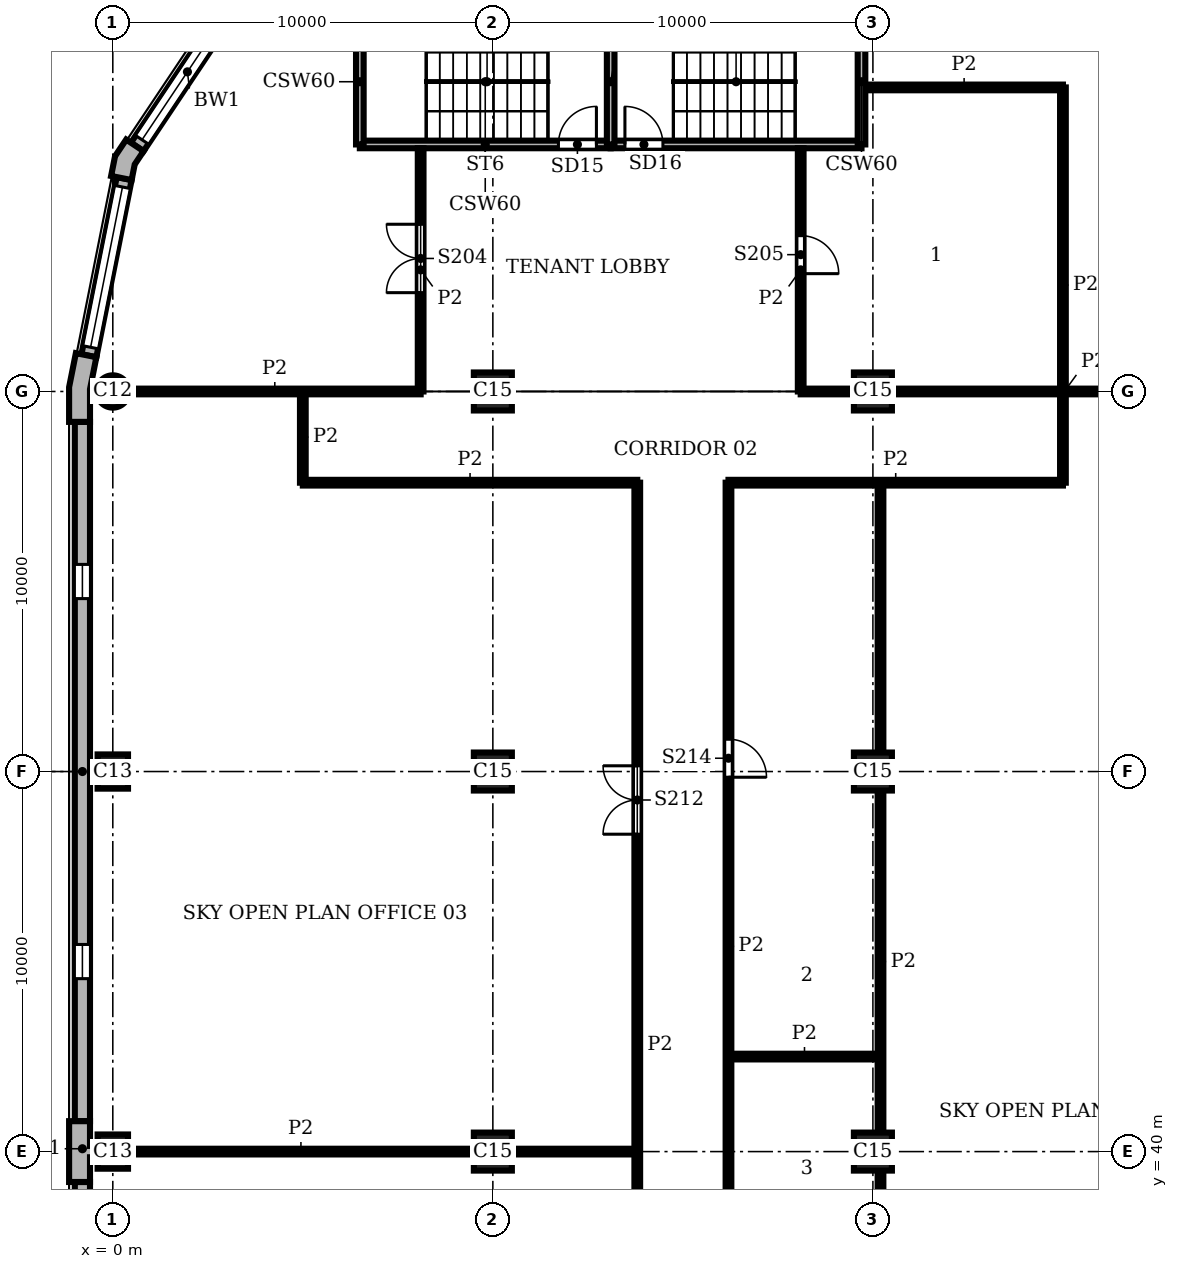
"""IFC4 building model, lengths in metres.
Left out: names, types, materials, properties, quantities, classifications, styles, units other than length and angle.
Written with IfcOpenShell. Run it as: python <this file> out.ifc"""

import sys

from ifc_helpers import new_model, si_unit, direction, frame, frame_2d, origin, origin_2d, place, context, subcontext, project, spatial, polyline, rectangle, circle, outline, extrude, element, fill, save


model = new_model("IFC4")
c1 = context("Model", 3, precision=1e-05, world=origin(), true_north=direction((0.0, 1.0)))
c2 = subcontext(c1, "Body", "Model", "MODEL_VIEW")
j1 = project(units=[si_unit("LENGTHUNIT", "METRE"), si_unit("PLANEANGLEUNIT", "RADIAN")], contexts=[c1])
p1 = place(None, origin())
s1 = spatial("IfcSite", under=j1, at=p1, CompositionType="ELEMENT")
p2 = place(p1, origin())
s2 = spatial("IfcBuilding", under=s1, at=p2, CompositionType="ELEMENT")
p3 = place(p2, frame((0.0, 0.0, 246.0)))
s3 = spatial("IfcBuildingStorey", under=s2, at=p3, CompositionType="ELEMENT", Elevation=246.0)
p4 = place(p3, frame((0.0, 60.0, 0.0), z_axis=(0.0, 0.0, 1.0), x_axis=(1.0, 0.0, 0.0)))
e1 = element("IfcColumn", 1, at=p4, inside=s3, PredefinedType="COLUMN", context=c2, shape_type="SweptSolid", body=[
    extrude(circle(Radius=0.425, at=origin_2d()), origin(), (0.0, 0.0, 1.0), 5.4),
])
for number, where, z_axis, x_axis in (
    (2, (0.0, 50.0, 0.0), (0.0, 0.0, 1.0), (0.0, 1.0, 0.0)),
    (3, (0.0, 40.0, 0.0), (0.0, 0.0, 1.0), (0.0, 1.0, 0.0)),
):
    element("IfcColumn", number, at=place(p3, frame(where, z_axis=z_axis, x_axis=x_axis)), inside=s3, PredefinedType="COLUMN", context=c2, shape_type="SweptSolid", body=[
        extrude(rectangle(XDim=0.9, YDim=0.8, at=origin_2d()), origin(), (0.0, 0.0, 1.0), 5.4),
    ])
for number, where, z_axis, x_axis in (
    (4, (10.0, 40.0, 0.0), (0.0, 0.0, 1.0), (1.0, 0.0, 0.0)),
    (5, (10.0, 50.0, 0.0), (0.0, 0.0, 1.0), (1.0, 0.0, 0.0)),
    (6, (10.0, 60.0, 0.0), (0.0, 0.0, 1.0), (1.0, 0.0, 0.0)),
    (7, (20.0, 40.0, 0.0), (0.0, 0.0, 1.0), (1.0, 0.0, 0.0)),
    (8, (20.0, 50.0, 0.0), (0.0, 0.0, 1.0), (1.0, 0.0, 0.0)),
    (9, (20.0, 60.0, 0.0), (0.0, 0.0, 1.0), (1.0, 0.0, 0.0)),
):
    element("IfcColumn", number, at=place(p3, frame(where, z_axis=z_axis, x_axis=x_axis)), inside=s3, PredefinedType="COLUMN", context=c2, shape_type="SweptSolid", body=[
        extrude(rectangle(XDim=1.0, YDim=1.0, at=origin_2d()), origin(), (0.0, 0.0, 1.0), 5.4),
    ])
p5 = place(p3, origin())
e10 = element("IfcWall", 10, at=p5, inside=s3, PredefinedType="SOLIDWALL", context=c2, shape_type="SweptSolid", body=[
    extrude(outline(polyline([(0.477, 66.545), (0.352, 66.629), (0.059, 66.189), (-0.045, 65.67), (0.103, 65.641), (0.495, 65.563), (0.577, 65.974), (0.81, 66.323), (0.477, 66.545)])), origin(), (0.0, 0.0, 1.0), 5.4),
])
e11 = element("IfcWall", 11, at=p5, inside=s3, PredefinedType="SOLIDWALL", context=c2, shape_type="SweptSolid", body=[
    extrude(outline(polyline([(-0.825, 60.98), (-0.972, 61.009), (-1.15, 60.113), (-1.15, 59.2), (-1.0, 59.2), (-0.6, 59.2), (-0.6, 60.059), (-0.432, 60.902), (-0.825, 60.98)])), origin(), (0.0, 0.0, 1.0), 5.4),
])
e12 = element("IfcWall", 12, at=p5, inside=s3, PredefinedType="SOLIDWALL", context=c2, shape_type="SweptSolid", body=[
    extrude(outline(polyline([(-0.6, 39.2), (-0.6, 39.85), (-0.45, 39.85), (-0.45, 40.15), (-0.6, 40.15), (-0.6, 40.8), (-1.0, 40.8), (-1.15, 40.8), (-1.15, 40.0), (-1.15, 39.2), (-1.0, 39.2), (-0.6, 39.2)])), origin(), (0.0, 0.0, 1.0), 5.4),
])
p6 = place(p3, frame((3.284, 70.386, 0.0), z_axis=(0.0, 0.0, 1.0), x_axis=(-0.555541552266, -0.831488775454, 0.0)))
e13 = element("IfcWall", 13, at=p6, inside=s3, PredefinedType="SOLIDWALL", context=c2, shape_type="SweptSolid", body=[
    extrude(rectangle(XDim=4.753, YDim=0.4, at=frame_2d((2.376, 0.0))), origin(), (0.0, 0.0, 1.0), 5.4),
])
p7 = place(p6, frame((0.226, 0.0, 0.9)))
e14 = element("IfcOpeningElement", 14, at=p7, cuts=e13, PredefinedType="OPENING", context=c2, shape_type="SweptSolid", body=[
    extrude(rectangle(XDim=4.3, YDim=3.4, at=frame_2d((2.15, 1.7))), frame((0.0, 0.21, 0.0), z_axis=(0.0, -1.0, 0.0), x_axis=(1.0, 0.0, 0.0)), (0.0, 0.0, 1.0), 0.42),
])
p8 = place(p3, frame((0.299, 65.602, 0.0), z_axis=(0.0, 0.0, 1.0), x_axis=(-0.195098533057, -0.98078364709, 0.0)))
e15 = element("IfcWall", 15, at=p8, inside=s3, PredefinedType="SOLIDWALL", context=c2, shape_type="SweptSolid", body=[
    extrude(rectangle(XDim=4.753, YDim=0.4, at=frame_2d((2.376, 0.0))), origin(), (0.0, 0.0, 1.0), 5.4),
])
p9 = place(p8, frame((0.226, 0.0, 0.9)))
e16 = element("IfcOpeningElement", 16, at=p9, cuts=e15, PredefinedType="OPENING", context=c2, shape_type="SweptSolid", body=[
    extrude(rectangle(XDim=4.3, YDim=3.4, at=frame_2d((2.15, 1.7))), frame((0.0, 0.21, 0.0), z_axis=(0.0, -1.0, 0.0), x_axis=(1.0, 0.0, 0.0)), (0.0, 0.0, 1.0), 0.42),
])
p10 = place(p3, frame((-0.8, 59.2, 0.0), z_axis=(0.0, 0.0, 1.0), x_axis=(0.0, -1.0, 0.0)))
e17 = element("IfcWall", 17, at=p10, inside=s3, PredefinedType="SOLIDWALL", context=c2, shape_type="SweptSolid", body=[
    extrude(rectangle(XDim=18.4, YDim=0.4, at=frame_2d((9.2, 0.0))), origin(), (0.0, 0.0, 1.0), 5.4),
])
p11 = place(p10, frame((3.75, 0.0, 0.9)))
e18 = element("IfcOpeningElement", 18, at=p11, cuts=e17, PredefinedType="OPENING", context=c2, shape_type="SweptSolid", body=[
    extrude(rectangle(XDim=0.9, YDim=3.4, at=frame_2d((0.45, 1.7))), frame((0.0, 0.21, 0.0), z_axis=(0.0, -1.0, 0.0), x_axis=(1.0, 0.0, 0.0)), (0.0, 0.0, 1.0), 0.42),
])
p12 = place(p10, frame((13.75, 0.0, 0.9)))
e19 = element("IfcOpeningElement", 19, at=p12, cuts=e17, PredefinedType="OPENING", context=c2, shape_type="SweptSolid", body=[
    extrude(rectangle(XDim=0.9, YDim=3.4, at=frame_2d((0.45, 1.7))), frame((0.0, 0.21, 0.0), z_axis=(0.0, -1.0, 0.0), x_axis=(1.0, 0.0, 0.0)), (0.0, 0.0, 1.0), 0.42),
])
p13 = place(p3, frame((-0.8, 39.2, 0.0), z_axis=(0.0, 0.0, 1.0), x_axis=(0.0, -1.0, 0.0)))
e20 = element("IfcWall", 20, at=p13, inside=s3, PredefinedType="SOLIDWALL", context=c2, shape_type="SweptSolid", body=[
    extrude(rectangle(XDim=18.4, YDim=0.4, at=frame_2d((9.2, 0.0))), origin(), (0.0, 0.0, 1.0), 5.4),
])
p14 = place(p13, frame((3.75, 0.0, 0.9)))
e21 = element("IfcOpeningElement", 21, at=p14, cuts=e20, PredefinedType="OPENING", context=c2, shape_type="SweptSolid", body=[
    extrude(rectangle(XDim=0.9, YDim=3.4, at=frame_2d((0.45, 1.7))), frame((0.0, 0.21, 0.0), z_axis=(0.0, -1.0, 0.0), x_axis=(1.0, 0.0, 0.0)), (0.0, 0.0, 1.0), 0.42),
])
p15 = place(p13, frame((13.75, 0.0, 0.9)))
e22 = element("IfcOpeningElement", 22, at=p15, cuts=e20, PredefinedType="OPENING", context=c2, shape_type="SweptSolid", body=[
    extrude(rectangle(XDim=0.9, YDim=3.4, at=frame_2d((0.45, 1.7))), frame((0.0, 0.21, 0.0), z_axis=(0.0, -1.0, 0.0), x_axis=(1.0, 0.0, 0.0)), (0.0, 0.0, 1.0), 0.42),
])
p16 = place(p3, frame((6.5, 66.5, 0.0), z_axis=(0.0, 0.0, 1.0), x_axis=(1.0, 0.0, 0.0)))
e23 = element("IfcWall", 23, at=p16, inside=s3, PredefinedType="SHEAR", context=c2, shape_type="SweptSolid", body=[
    extrude(rectangle(XDim=6.6, YDim=0.2, at=frame_2d((3.3, 0.0))), origin(), (0.0, 0.0, 1.0), 5.08),
])
p17 = place(p16, frame((5.225, 0.0, 0.0)))
e24 = element("IfcOpeningElement", 24, at=p17, cuts=e23, PredefinedType="OPENING", context=c2, shape_type="SweptSolid", body=[
    extrude(rectangle(XDim=1.0, YDim=2.1, at=frame_2d((0.5, 1.05))), frame((0.0, 0.11, 0.0), z_axis=(0.0, -1.0, 0.0), x_axis=(1.0, 0.0, 0.0)), (0.0, 0.0, 1.0), 0.22),
])
p18 = place(p3, frame((13.1, 66.5, 0.0), z_axis=(0.0, 0.0, 1.0), x_axis=(1.0, 0.0, 0.0)))
e25 = element("IfcWall", 25, at=p18, inside=s3, PredefinedType="SHEAR", context=c2, shape_type="SweptSolid", body=[
    extrude(rectangle(XDim=6.6, YDim=0.2, at=frame_2d((3.3, 0.0))), origin(), (0.0, 0.0, 1.0), 5.08),
])
p19 = place(p18, frame((0.375, 0.0, 0.0)))
e26 = element("IfcOpeningElement", 26, at=p19, cuts=e25, PredefinedType="OPENING", context=c2, shape_type="SweptSolid", body=[
    extrude(rectangle(XDim=1.0, YDim=2.1, at=frame_2d((0.5, 1.05))), frame((0.0, 0.11, 0.0), z_axis=(0.0, -1.0, 0.0), x_axis=(1.0, 0.0, 0.0)), (0.0, 0.0, 1.0), 0.22),
])
for number, where, z_axis, x_axis in (
    (27, (6.5, 66.5, 0.0), (0.0, 0.0, 1.0), (0.0, 1.0, 0.0)),
    (28, (13.1, 66.5, 0.0), (0.0, 0.0, 1.0), (0.0, 1.0, 0.0)),
    (29, (19.7, 66.5, 0.0), (0.0, 0.0, 1.0), (0.0, 1.0, 0.0)),
):
    element("IfcWall", number, at=place(p3, frame(where, z_axis=z_axis, x_axis=x_axis)), inside=s3, PredefinedType="SHEAR", context=c2, shape_type="SweptSolid", body=[
        extrude(rectangle(XDim=3.3, YDim=0.2, at=frame_2d((1.65, 0.0))), origin(), (0.0, 0.0, 1.0), 5.08),
    ])
p20 = place(p3, frame((5.0, 57.6, 0.0), z_axis=(0.0, 0.0, 1.0), x_axis=(0.0, 1.0, 0.0)))
e30 = element("IfcWall", 30, at=p20, inside=s3, PredefinedType="PARTITIONING", context=c2, shape_type="SweptSolid", body=[
    extrude(rectangle(XDim=2.4, YDim=0.15, at=frame_2d((1.2, 0.0))), origin(), (0.0, 0.0, 1.0), 5.08),
])
p21 = place(p3, frame((8.1, 60.0, 0.0), z_axis=(0.0, 0.0, 1.0), x_axis=(0.0, 1.0, 0.0)))
e31 = element("IfcWall", 31, at=p21, inside=s3, PredefinedType="PARTITIONING", context=c2, shape_type="SweptSolid", body=[
    extrude(rectangle(XDim=6.4, YDim=0.15, at=frame_2d((3.2, 0.0))), origin(), (0.0, 0.0, 1.0), 5.08),
])
p22 = place(p21, frame((2.6, 0.0, 0.0)))
e32 = element("IfcOpeningElement", 32, at=p22, cuts=e31, PredefinedType="OPENING", context=c2, shape_type="SweptSolid", body=[
    extrude(rectangle(XDim=1.8, YDim=2.1, at=frame_2d((0.9, 1.05))), frame((0.0, 0.085, 0.0), z_axis=(0.0, -1.0, 0.0), x_axis=(1.0, 0.0, 0.0)), (0.0, 0.0, 1.0), 0.17),
])
p23 = place(p3, frame((13.8, 28.0, 0.0), z_axis=(0.0, 0.0, 1.0), x_axis=(0.0, 1.0, 0.0)))
e33 = element("IfcWall", 33, at=p23, inside=s3, PredefinedType="PARTITIONING", context=c2, shape_type="SweptSolid", body=[
    extrude(rectangle(XDim=29.6, YDim=0.15, at=frame_2d((14.8, 0.0))), origin(), (0.0, 0.0, 1.0), 5.08),
])
p24 = place(p23, frame((20.351, 0.0, 0.0)))
e34 = element("IfcOpeningElement", 34, at=p24, cuts=e33, PredefinedType="OPENING", context=c2, shape_type="SweptSolid", body=[
    extrude(rectangle(XDim=1.8, YDim=2.1, at=frame_2d((0.9, 1.05))), frame((0.0, 0.085, 0.0), z_axis=(0.0, -1.0, 0.0), x_axis=(1.0, 0.0, 0.0)), (0.0, 0.0, 1.0), 0.17),
])
p25 = place(p3, frame((16.2, 33.2, 0.0), z_axis=(0.0, 0.0, 1.0), x_axis=(0.0, 1.0, 0.0)))
e35 = element("IfcWall", 35, at=p25, inside=s3, PredefinedType="PARTITIONING", context=c2, shape_type="SweptSolid", body=[
    extrude(rectangle(XDim=24.4, YDim=0.15, at=frame_2d((12.2, 0.0))), origin(), (0.0, 0.0, 1.0), 5.08),
])
p26 = place(p25, frame((4.35, 0.0, 0.0)))
e36 = element("IfcOpeningElement", 36, at=p26, cuts=e35, PredefinedType="OPENING", context=c2, shape_type="SweptSolid", body=[
    extrude(rectangle(XDim=1.0, YDim=2.1, at=frame_2d((0.5, 1.05))), frame((0.0, 0.085, 0.0), z_axis=(0.0, -1.0, 0.0), x_axis=(1.0, 0.0, 0.0)), (0.0, 0.0, 1.0), 0.17),
])
p27 = place(p25, frame((16.65, 0.0, 0.0)))
e37 = element("IfcOpeningElement", 37, at=p27, cuts=e35, PredefinedType="OPENING", context=c2, shape_type="SweptSolid", body=[
    extrude(rectangle(XDim=1.0, YDim=2.1, at=frame_2d((0.5, 1.05))), frame((0.0, 0.085, 0.0), z_axis=(0.0, -1.0, 0.0), x_axis=(1.0, 0.0, 0.0)), (0.0, 0.0, 1.0), 0.17),
])
p28 = place(p3, frame((18.1, 60.0, 0.0), z_axis=(0.0, 0.0, 1.0), x_axis=(0.0, 1.0, 0.0)))
e38 = element("IfcWall", 38, at=p28, inside=s3, PredefinedType="PARTITIONING", context=c2, shape_type="SweptSolid", body=[
    extrude(rectangle(XDim=6.4, YDim=0.15, at=frame_2d((3.2, 0.0))), origin(), (0.0, 0.0, 1.0), 5.08),
])
p29 = place(p28, frame((3.1, 0.0, 0.0)))
e39 = element("IfcOpeningElement", 39, at=p29, cuts=e38, PredefinedType="OPENING", context=c2, shape_type="SweptSolid", body=[
    extrude(rectangle(XDim=1.0, YDim=2.1, at=frame_2d((0.5, 1.05))), frame((0.0, 0.085, 0.0), z_axis=(0.0, -1.0, 0.0), x_axis=(1.0, 0.0, 0.0)), (0.0, 0.0, 1.0), 0.17),
])
p30 = place(p3, frame((20.2, 33.2, 0.0), z_axis=(0.0, 0.0, 1.0), x_axis=(0.0, 1.0, 0.0)))
e40 = element("IfcWall", 40, at=p30, inside=s3, PredefinedType="PARTITIONING", context=c2, shape_type="SweptSolid", body=[
    extrude(rectangle(XDim=6.3, YDim=0.15, at=frame_2d((3.15, 0.0))), origin(), (0.0, 0.0, 1.0), 5.08),
])
p31 = place(p3, frame((20.2, 40.5, 0.0), z_axis=(0.0, 0.0, 1.0), x_axis=(0.0, 1.0, 0.0)))
e41 = element("IfcWall", 41, at=p31, inside=s3, PredefinedType="PARTITIONING", context=c2, shape_type="SweptSolid", body=[
    extrude(rectangle(XDim=9.0, YDim=0.15, at=frame_2d((4.5, 0.0))), origin(), (0.0, 0.0, 1.0), 5.08),
])
p32 = place(p3, frame((20.2, 50.5, 0.0), z_axis=(0.0, 0.0, 1.0), x_axis=(0.0, 1.0, 0.0)))
e42 = element("IfcWall", 42, at=p32, inside=s3, PredefinedType="PARTITIONING", context=c2, shape_type="SweptSolid", body=[
    extrude(rectangle(XDim=7.1, YDim=0.15, at=frame_2d((3.55, 0.0))), origin(), (0.0, 0.0, 1.0), 5.08),
])
p33 = place(p3, frame((25.0, 57.6, 0.0), z_axis=(0.0, 0.0, 1.0), x_axis=(0.0, 1.0, 0.0)))
e43 = element("IfcWall", 43, at=p33, inside=s3, PredefinedType="PARTITIONING", context=c2, shape_type="SweptSolid", body=[
    extrude(rectangle(XDim=10.4, YDim=0.15, at=frame_2d((5.2, 0.0))), origin(), (0.0, 0.0, 1.0), 5.08),
])
p34 = place(p3, frame((0.4, 40.0, 0.0), z_axis=(0.0, 0.0, 1.0), x_axis=(1.0, 0.0, 0.0)))
e44 = element("IfcWall", 44, at=p34, inside=s3, PredefinedType="PARTITIONING", context=c2, shape_type="SweptSolid", body=[
    extrude(rectangle(XDim=9.1, YDim=0.15, at=frame_2d((4.55, 0.0))), origin(), (0.0, 0.0, 1.0), 5.08),
])
p35 = place(p3, frame((10.5, 40.0, 0.0), z_axis=(0.0, 0.0, 1.0), x_axis=(1.0, 0.0, 0.0)))
e45 = element("IfcWall", 45, at=p35, inside=s3, PredefinedType="PARTITIONING", context=c2, shape_type="SweptSolid", body=[
    extrude(rectangle(XDim=3.3, YDim=0.15, at=frame_2d((1.65, 0.0))), origin(), (0.0, 0.0, 1.0), 5.08),
])
p36 = place(p3, frame((16.2, 42.5, 0.0), z_axis=(0.0, 0.0, 1.0), x_axis=(1.0, 0.0, 0.0)))
e46 = element("IfcWall", 46, at=p36, inside=s3, PredefinedType="PARTITIONING", context=c2, shape_type="SweptSolid", body=[
    extrude(rectangle(XDim=4.0, YDim=0.15, at=frame_2d((2.0, 0.0))), origin(), (0.0, 0.0, 1.0), 5.08),
])
for number, where, z_axis, x_axis in (
    (47, (5.0, 57.6, 0.0), (0.0, 0.0, 1.0), (1.0, 0.0, 0.0)),
    (48, (16.2, 57.6, 0.0), (0.0, 0.0, 1.0), (1.0, 0.0, 0.0)),
):
    element("IfcWall", number, at=place(p3, frame(where, z_axis=z_axis, x_axis=x_axis)), inside=s3, PredefinedType="PARTITIONING", context=c2, shape_type="SweptSolid", body=[
        extrude(rectangle(XDim=8.8, YDim=0.15, at=frame_2d((4.4, 0.0))), origin(), (0.0, 0.0, 1.0), 5.08),
    ])
p37 = place(p3, frame((0.425, 60.0, 0.0), z_axis=(0.0, 0.0, 1.0), x_axis=(1.0, 0.0, 0.0)))
e49 = element("IfcWall", 49, at=p37, inside=s3, PredefinedType="PARTITIONING", context=c2, shape_type="SweptSolid", body=[
    extrude(rectangle(XDim=7.675, YDim=0.15, at=frame_2d((3.837, 0.0))), origin(), (0.0, 0.0, 1.0), 5.08),
])
p38 = place(p3, frame((18.1, 60.0, 0.0), z_axis=(0.0, 0.0, 1.0), x_axis=(1.0, 0.0, 0.0)))
e50 = element("IfcWall", 50, at=p38, inside=s3, PredefinedType="PARTITIONING", context=c2, shape_type="SweptSolid", body=[
    extrude(rectangle(XDim=1.4, YDim=0.15, at=frame_2d((0.7, 0.0))), origin(), (0.0, 0.0, 1.0), 5.08),
])
p39 = place(p3, frame((20.5, 60.0, 0.0), z_axis=(0.0, 0.0, 1.0), x_axis=(1.0, 0.0, 0.0)))
e51 = element("IfcWall", 51, at=p39, inside=s3, PredefinedType="PARTITIONING", context=c2, shape_type="SweptSolid", body=[
    extrude(rectangle(XDim=9.075, YDim=0.15, at=frame_2d((4.538, 0.0))), origin(), (0.0, 0.0, 1.0), 5.08),
])
p40 = place(p3, frame((19.8, 68.0, 0.0), z_axis=(0.0, 0.0, 1.0), x_axis=(1.0, 0.0, 0.0)))
e52 = element("IfcWall", 52, at=p40, inside=s3, PredefinedType="PARTITIONING", context=c2, shape_type="SweptSolid", body=[
    extrude(rectangle(XDim=5.2, YDim=0.15, at=frame_2d((2.6, 0.0))), origin(), (0.0, 0.0, 1.0), 5.08),
])
p41 = place(p7, origin())
e53 = element("IfcWindow", 53, at=p41, inside=s3, PartitioningType="SINGLE_PANEL", PredefinedType="WINDOW", context=c2, shape_type="SweptSolid", body=[
    extrude(rectangle(XDim=4.3, YDim=3.4, at=frame_2d((2.15, 1.7))), frame((0.0, 0.16, 0.0), z_axis=(0.0, -1.0, 0.0), x_axis=(1.0, 0.0, 0.0)), (0.0, 0.0, 1.0), 0.06),
])
fill(e14, e53)
p42 = place(p9, origin())
e54 = element("IfcWindow", 54, at=p42, inside=s3, PartitioningType="SINGLE_PANEL", PredefinedType="WINDOW", context=c2, shape_type="SweptSolid", body=[
    extrude(rectangle(XDim=4.3, YDim=3.4, at=frame_2d((2.15, 1.7))), frame((0.0, 0.16, 0.0), z_axis=(0.0, -1.0, 0.0), x_axis=(1.0, 0.0, 0.0)), (0.0, 0.0, 1.0), 0.06),
])
fill(e16, e54)
p43 = place(p11, origin())
e55 = element("IfcWindow", 55, at=p43, inside=s3, PartitioningType="SINGLE_PANEL", PredefinedType="WINDOW", context=c2, shape_type="SweptSolid", body=[
    extrude(rectangle(XDim=0.9, YDim=3.4, at=frame_2d((0.45, 1.7))), frame((0.0, 0.16, 0.0), z_axis=(0.0, -1.0, 0.0), x_axis=(1.0, 0.0, 0.0)), (0.0, 0.0, 1.0), 0.06),
])
fill(e18, e55)
p44 = place(p12, origin())
e56 = element("IfcWindow", 56, at=p44, inside=s3, PartitioningType="SINGLE_PANEL", PredefinedType="WINDOW", context=c2, shape_type="SweptSolid", body=[
    extrude(rectangle(XDim=0.9, YDim=3.4, at=frame_2d((0.45, 1.7))), frame((0.0, 0.16, 0.0), z_axis=(0.0, -1.0, 0.0), x_axis=(1.0, 0.0, 0.0)), (0.0, 0.0, 1.0), 0.06),
])
fill(e19, e56)
p45 = place(p17, origin())
e57 = element("IfcDoor", 57, at=p45, inside=s3, OperationType="SINGLE_SWING_RIGHT", PredefinedType="DOOR", context=c2, shape_type="SweptSolid", body=[
    extrude(rectangle(XDim=1.0, YDim=2.1, at=frame_2d((0.5, 1.05))), frame((0.0, 0.025, 0.0), z_axis=(0.0, -1.0, 0.0), x_axis=(1.0, 0.0, 0.0)), (0.0, 0.0, 1.0), 0.05),
])
fill(e24, e57)
p46 = place(p19, origin())
e58 = element("IfcDoor", 58, at=p46, inside=s3, OperationType="SINGLE_SWING_LEFT", PredefinedType="DOOR", context=c2, shape_type="SweptSolid", body=[
    extrude(rectangle(XDim=1.0, YDim=2.1, at=frame_2d((0.5, 1.05))), frame((0.0, 0.025, 0.0), z_axis=(0.0, -1.0, 0.0), x_axis=(1.0, 0.0, 0.0)), (0.0, 0.0, 1.0), 0.05),
])
fill(e26, e58)
p47 = place(p22, origin())
e59 = element("IfcDoor", 59, at=p47, inside=s3, OperationType="DOUBLE_DOOR_SINGLE_SWING", PredefinedType="DOOR", context=c2, shape_type="SweptSolid", body=[
    extrude(rectangle(XDim=1.8, YDim=2.1, at=frame_2d((0.9, 1.05))), frame((0.0, 0.025, 0.0), z_axis=(0.0, -1.0, 0.0), x_axis=(1.0, 0.0, 0.0)), (0.0, 0.0, 1.0), 0.05),
])
fill(e32, e59)
p48 = place(p29, frame((1.0, 0.0, 0.0), z_axis=(0.0, 0.0, 1.0), x_axis=(-1.0, 0.0, 0.0)))
e60 = element("IfcDoor", 60, at=p48, inside=s3, OperationType="SINGLE_SWING_RIGHT", PredefinedType="DOOR", context=c2, shape_type="SweptSolid", body=[
    extrude(rectangle(XDim=1.0, YDim=2.1, at=frame_2d((0.5, 1.05))), frame((0.0, 0.025, 0.0), z_axis=(0.0, -1.0, 0.0), x_axis=(1.0, 0.0, 0.0)), (0.0, 0.0, 1.0), 0.05),
])
fill(e39, e60)
p49 = place(p24, origin())
e61 = element("IfcDoor", 61, at=p49, inside=s3, OperationType="DOUBLE_DOOR_SINGLE_SWING", PredefinedType="DOOR", context=c2, shape_type="SweptSolid", body=[
    extrude(rectangle(XDim=1.8, YDim=2.1, at=frame_2d((0.9, 1.05))), frame((0.0, 0.025, 0.0), z_axis=(0.0, -1.0, 0.0), x_axis=(1.0, 0.0, 0.0)), (0.0, 0.0, 1.0), 0.05),
])
fill(e34, e61)
p50 = place(p27, frame((1.0, 0.0, 0.0), z_axis=(0.0, 0.0, 1.0), x_axis=(-1.0, 0.0, 0.0)))
e62 = element("IfcDoor", 62, at=p50, inside=s3, OperationType="SINGLE_SWING_RIGHT", PredefinedType="DOOR", context=c2, shape_type="SweptSolid", body=[
    extrude(rectangle(XDim=1.0, YDim=2.1, at=frame_2d((0.5, 1.05))), frame((0.0, 0.025, 0.0), z_axis=(0.0, -1.0, 0.0), x_axis=(1.0, 0.0, 0.0)), (0.0, 0.0, 1.0), 0.05),
])
fill(e37, e62)
save(model, sys.argv[1])
